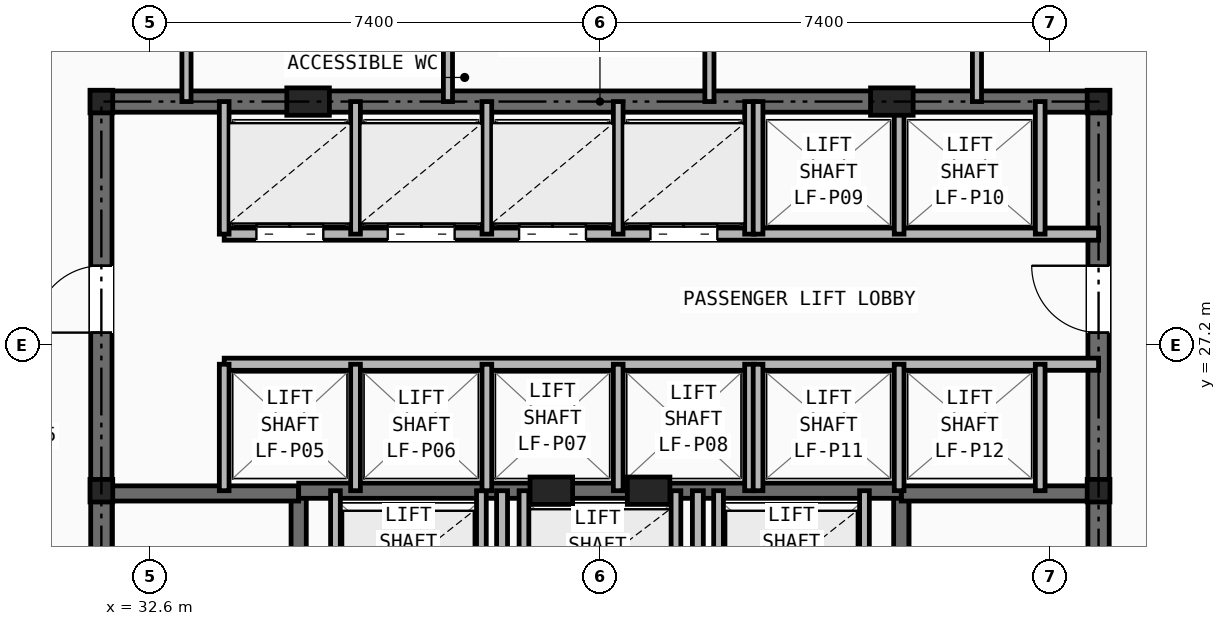
"""IFC4 building model, lengths in metres.
Left out: names, types, materials, properties, quantities, classifications, styles, units other than length and angle.
Written with IfcOpenShell. Run it as: python <this file> out.ifc"""

import sys

from ifc_helpers import new_model, si_unit, direction, frame, frame_2d, origin, origin_2d, place, context, subcontext, project, spatial, rectangle, i_section, extrude, element, fill, save


model = new_model("IFC4")
c1 = context("Model", 3, precision=1e-05, world=origin(), true_north=direction((0.0, 1.0)))
c2 = subcontext(c1, "Body", "Model", "MODEL_VIEW")
j1 = project(units=[si_unit("LENGTHUNIT", "METRE"), si_unit("PLANEANGLEUNIT", "RADIAN")], contexts=[c1])
p1 = place(None, origin())
s1 = spatial("IfcSite", under=j1, at=p1, CompositionType="ELEMENT")
p2 = place(p1, origin())
s2 = spatial("IfcBuilding", under=s1, at=p2, CompositionType="ELEMENT")
p3 = place(p2, frame((0.0, 0.0, 59.2)))
s3 = spatial("IfcBuildingStorey", under=s2, at=p3, CompositionType="ELEMENT", Elevation=59.2)
for number, where, z_axis, x_axis in (
    (1, (31.8, 24.8, 0.0), (0.0, 0.0, 1.0), (1.0, 0.0, 0.0)),
    (2, (48.2, 24.8, 0.0), (0.0, 0.0, 1.0), (1.0, 0.0, 0.0)),
    (3, (31.8, 31.2, 0.0), (0.0, 0.0, 1.0), (1.0, 0.0, 0.0)),
    (4, (48.2, 31.2, 0.0), (0.0, 0.0, 1.0), (1.0, 0.0, 0.0)),
):
    element("IfcColumn", number, at=place(p3, frame(where, z_axis=z_axis, x_axis=x_axis)), inside=s3, PredefinedType="COLUMN", context=c2, shape_type="SweptSolid", body=[
        extrude(i_section(OverallWidth=0.374, OverallDepth=0.372, WebThickness=0.016, FlangeThickness=0.026, at=origin_2d()), origin(), (0.0, 0.0, 1.0), 3.2),
    ])
for number, where, z_axis, x_axis in (
    (5, (35.2, 31.2, 0.0), (0.0, 0.0, 1.0), (1.0, 0.0, 0.0)),
    (6, (44.8, 31.2, 0.0), (0.0, 0.0, 1.0), (1.0, 0.0, 0.0)),
    (7, (39.2, 24.8, 0.0), (0.0, 0.0, 1.0), (1.0, 0.0, 0.0)),
    (8, (40.8, 24.8, 0.0), (0.0, 0.0, 1.0), (1.0, 0.0, 0.0)),
):
    element("IfcColumn", number, at=place(p3, frame(where, z_axis=z_axis, x_axis=x_axis)), inside=s3, PredefinedType="PILASTER", context=c2, shape_type="SweptSolid", body=[
        extrude(rectangle(XDim=0.7, YDim=0.45, at=origin_2d()), origin(), (0.0, 0.0, 1.0), 3.2),
    ])
p4 = place(p3, frame((31.8, 31.2, 0.0), z_axis=(0.0, 0.0, 1.0), x_axis=(1.0, 0.0, 0.0)))
e9 = element("IfcWall", 9, at=p4, inside=s3, PredefinedType="SHEAR", context=c2, shape_type="SweptSolid", body=[
    extrude(rectangle(XDim=16.4, YDim=0.35, at=frame_2d((8.2, 0.0))), origin(), (0.0, 0.0, 1.0), 2.98),
])
p5 = place(p3, frame((31.8, 16.4, 0.0), z_axis=(0.0, 0.0, 1.0), x_axis=(0.0, 1.0, 0.0)))
e10 = element("IfcWall", 10, at=p5, inside=s3, PredefinedType="SHEAR", context=c2, shape_type="SweptSolid", body=[
    extrude(rectangle(XDim=14.8, YDim=0.35, at=frame_2d((7.4, 0.0))), origin(), (0.0, 0.0, 1.0), 2.98),
])
p6 = place(p5, frame((11.0, 0.0, 0.0)))
e11 = element("IfcOpeningElement", 11, at=p6, cuts=e10, PredefinedType="OPENING", context=c2, shape_type="SweptSolid", body=[
    extrude(rectangle(XDim=1.1, YDim=2.15, at=frame_2d((0.55, 1.075))), frame((0.0, 0.185, 0.0), z_axis=(0.0, -1.0, 0.0), x_axis=(1.0, 0.0, 0.0)), (0.0, 0.0, 1.0), 0.37),
])
p7 = place(p3, frame((48.2, 16.4, 0.0), z_axis=(0.0, 0.0, 1.0), x_axis=(0.0, 1.0, 0.0)))
e12 = element("IfcWall", 12, at=p7, inside=s3, PredefinedType="SHEAR", context=c2, shape_type="SweptSolid", body=[
    extrude(rectangle(XDim=14.8, YDim=0.35, at=frame_2d((7.4, 0.0))), origin(), (0.0, 0.0, 1.0), 2.98),
])
p8 = place(p7, frame((11.0, 0.0, 0.0)))
e13 = element("IfcOpeningElement", 13, at=p8, cuts=e12, PredefinedType="OPENING", context=c2, shape_type="SweptSolid", body=[
    extrude(rectangle(XDim=1.1, YDim=2.15, at=frame_2d((0.55, 1.075))), frame((0.0, 0.185, 0.0), z_axis=(0.0, -1.0, 0.0), x_axis=(1.0, 0.0, 0.0)), (0.0, 0.0, 1.0), 0.37),
])
p9 = place(p3, frame((35.045, 16.4, 0.0), z_axis=(0.0, 0.0, 1.0), x_axis=(0.0, 1.0, 0.0)))
e14 = element("IfcWall", 14, at=p9, inside=s3, PredefinedType="SHEAR", context=c2, shape_type="SweptSolid", body=[
    extrude(rectangle(XDim=8.4, YDim=0.25, at=frame_2d((4.2, 0.0))), origin(), (0.0, 0.0, 1.0), 2.98),
])
p10 = place(p9, frame((0.45, 0.0, 0.0)))
e15 = element("IfcOpeningElement", 15, at=p10, cuts=e14, PredefinedType="OPENING", context=c2, shape_type="SweptSolid", body=[
    extrude(rectangle(XDim=0.95, YDim=2.1, at=frame_2d((0.475, 1.05))), frame((0.0, 0.135, 0.0), z_axis=(0.0, -1.0, 0.0), x_axis=(1.0, 0.0, 0.0)), (0.0, 0.0, 1.0), 0.27),
])
p11 = place(p3, frame((31.8, 24.755, 0.0), z_axis=(0.0, 0.0, 1.0), x_axis=(1.0, 0.0, 0.0)))
e16 = element("IfcWall", 16, at=p11, inside=s3, PredefinedType="SHEAR", context=c2, shape_type="SweptSolid", body=[
    extrude(rectangle(XDim=3.245, YDim=0.25, at=frame_2d((1.623, 0.0))), origin(), (0.0, 0.0, 1.0), 2.98),
])
p12 = place(p3, frame((44.955, 16.4, 0.0), z_axis=(0.0, 0.0, 1.0), x_axis=(0.0, 1.0, 0.0)))
e17 = element("IfcWall", 17, at=p12, inside=s3, PredefinedType="SHEAR", context=c2, shape_type="SweptSolid", body=[
    extrude(rectangle(XDim=8.4, YDim=0.25, at=frame_2d((4.2, 0.0))), origin(), (0.0, 0.0, 1.0), 2.98),
])
p13 = place(p12, frame((0.45, 0.0, 0.0)))
e18 = element("IfcOpeningElement", 18, at=p13, cuts=e17, PredefinedType="OPENING", context=c2, shape_type="SweptSolid", body=[
    extrude(rectangle(XDim=0.95, YDim=2.1, at=frame_2d((0.475, 1.05))), frame((0.0, 0.135, 0.0), z_axis=(0.0, -1.0, 0.0), x_axis=(1.0, 0.0, 0.0)), (0.0, 0.0, 1.0), 0.27),
])
p14 = place(p3, frame((44.955, 24.755, 0.0), z_axis=(0.0, 0.0, 1.0), x_axis=(1.0, 0.0, 0.0)))
e19 = element("IfcWall", 19, at=p14, inside=s3, PredefinedType="SHEAR", context=c2, shape_type="SweptSolid", body=[
    extrude(rectangle(XDim=3.245, YDim=0.25, at=frame_2d((1.623, 0.0))), origin(), (0.0, 0.0, 1.0), 2.98),
])
p15 = place(p3, frame((35.045, 24.8, 0.0), z_axis=(0.0, 0.0, 1.0), x_axis=(1.0, 0.0, 0.0)))
e20 = element("IfcWall", 20, at=p15, inside=s3, PredefinedType="SHEAR", context=c2, shape_type="SweptSolid", body=[
    extrude(rectangle(XDim=9.91, YDim=0.25, at=frame_2d((4.955, 0.0))), origin(), (0.0, 0.0, 1.0), 2.98),
])
p16 = place(p3, frame((38.39, 16.4, 0.0), z_axis=(0.0, 0.0, 1.0), x_axis=(0.0, 1.0, 0.0)))
e21 = element("IfcWall", 21, at=p16, inside=s3, PredefinedType="PARTITIONING", context=c2, shape_type="SweptSolid", body=[
    extrude(rectangle(XDim=8.4, YDim=0.18, at=frame_2d((4.2, 0.0))), origin(), (0.0, 0.0, 1.0), 2.431),
])
p17 = place(p16, frame((1.8, 0.0, 0.0)))
e22 = element("IfcOpeningElement", 22, at=p17, cuts=e21, PredefinedType="OPENING", context=c2, shape_type="SweptSolid", body=[
    extrude(rectangle(XDim=0.85, YDim=2.05, at=frame_2d((0.425, 1.025))), frame((0.0, 0.1, 0.0), z_axis=(0.0, -1.0, 0.0), x_axis=(1.0, 0.0, 0.0)), (0.0, 0.0, 1.0), 0.2),
])
p18 = place(p16, frame((4.35, 0.0, 0.0)))
e23 = element("IfcOpeningElement", 23, at=p18, cuts=e21, PredefinedType="OPENING", context=c2, shape_type="SweptSolid", body=[
    extrude(rectangle(XDim=0.95, YDim=2.1, at=frame_2d((0.475, 1.05))), frame((0.0, 0.1, 0.0), z_axis=(0.0, -1.0, 0.0), x_axis=(1.0, 0.0, 0.0)), (0.0, 0.0, 1.0), 0.2),
])
p19 = place(p3, frame((41.61, 16.4, 0.0), z_axis=(0.0, 0.0, 1.0), x_axis=(0.0, 1.0, 0.0)))
e24 = element("IfcWall", 24, at=p19, inside=s3, PredefinedType="PARTITIONING", context=c2, shape_type="SweptSolid", body=[
    extrude(rectangle(XDim=8.4, YDim=0.18, at=frame_2d((4.2, 0.0))), origin(), (0.0, 0.0, 1.0), 2.431),
])
p20 = place(p19, frame((1.8, 0.0, 0.0)))
e25 = element("IfcOpeningElement", 25, at=p20, cuts=e24, PredefinedType="OPENING", context=c2, shape_type="SweptSolid", body=[
    extrude(rectangle(XDim=0.85, YDim=2.05, at=frame_2d((0.425, 1.025))), frame((0.0, 0.1, 0.0), z_axis=(0.0, -1.0, 0.0), x_axis=(1.0, 0.0, 0.0)), (0.0, 0.0, 1.0), 0.2),
])
for number, where, z_axis, x_axis in (
    (26, (35.65, 22.48, 0.0), (0.0, 0.0, 1.0), (0.0, 1.0, 0.0)),
    (27, (38.05, 22.48, 0.0), (0.0, 0.0, 1.0), (0.0, 1.0, 0.0)),
    (28, (41.95, 22.48, 0.0), (0.0, 0.0, 1.0), (0.0, 1.0, 0.0)),
    (29, (44.35, 22.48, 0.0), (0.0, 0.0, 1.0), (0.0, 1.0, 0.0)),
    (30, (38.75, 22.48, 0.0), (0.0, 0.0, 1.0), (0.0, 1.0, 0.0)),
    (31, (41.25, 22.48, 0.0), (0.0, 0.0, 1.0), (0.0, 1.0, 0.0)),
):
    element("IfcWall", number, at=place(p3, frame(where, z_axis=z_axis, x_axis=x_axis)), inside=s3, PredefinedType="SOLIDWALL", context=c2, shape_type="SweptSolid", body=[
        extrude(rectangle(XDim=2.32, YDim=0.16, at=frame_2d((1.16, 0.0))), origin(), (0.0, 0.0, 1.0), 2.98),
    ])
p21 = place(p3, frame((33.82, 29.02, 0.0), z_axis=(0.0, 0.0, 1.0), x_axis=(1.0, 0.0, 0.0)))
e32 = element("IfcWall", 32, at=p21, inside=s3, PredefinedType="SOLIDWALL", context=c2, shape_type="SweptSolid", body=[
    extrude(rectangle(XDim=14.38, YDim=0.2, at=frame_2d((7.19, 0.0))), origin(), (0.0, 0.0, 1.0), 2.431),
])
p22 = place(p21, frame((0.53, 0.0, 0.0)))
e33 = element("IfcOpeningElement", 33, at=p22, cuts=e32, PredefinedType="OPENING", context=c2, shape_type="SweptSolid", body=[
    extrude(rectangle(XDim=1.1, YDim=2.15, at=frame_2d((0.55, 1.075))), frame((0.0, 0.11, 0.0), z_axis=(0.0, -1.0, 0.0), x_axis=(1.0, 0.0, 0.0)), (0.0, 0.0, 1.0), 0.22),
])
p23 = place(p21, frame((2.69, 0.0, 0.0)))
e34 = element("IfcOpeningElement", 34, at=p23, cuts=e32, PredefinedType="OPENING", context=c2, shape_type="SweptSolid", body=[
    extrude(rectangle(XDim=1.1, YDim=2.15, at=frame_2d((0.55, 1.075))), frame((0.0, 0.11, 0.0), z_axis=(0.0, -1.0, 0.0), x_axis=(1.0, 0.0, 0.0)), (0.0, 0.0, 1.0), 0.22),
])
p24 = place(p21, frame((4.85, 0.0, 0.0)))
e35 = element("IfcOpeningElement", 35, at=p24, cuts=e32, PredefinedType="OPENING", context=c2, shape_type="SweptSolid", body=[
    extrude(rectangle(XDim=1.1, YDim=2.15, at=frame_2d((0.55, 1.075))), frame((0.0, 0.11, 0.0), z_axis=(0.0, -1.0, 0.0), x_axis=(1.0, 0.0, 0.0)), (0.0, 0.0, 1.0), 0.22),
])
p25 = place(p21, frame((7.01, 0.0, 0.0)))
e36 = element("IfcOpeningElement", 36, at=p25, cuts=e32, PredefinedType="OPENING", context=c2, shape_type="SweptSolid", body=[
    extrude(rectangle(XDim=1.1, YDim=2.15, at=frame_2d((0.55, 1.075))), frame((0.0, 0.11, 0.0), z_axis=(0.0, -1.0, 0.0), x_axis=(1.0, 0.0, 0.0)), (0.0, 0.0, 1.0), 0.22),
])
p26 = place(p3, frame((33.82, 26.88, 0.0), z_axis=(0.0, 0.0, 1.0), x_axis=(1.0, 0.0, 0.0)))
e37 = element("IfcWall", 37, at=p26, inside=s3, PredefinedType="SOLIDWALL", context=c2, shape_type="SweptSolid", body=[
    extrude(rectangle(XDim=14.38, YDim=0.2, at=frame_2d((7.19, 0.0))), origin(), (0.0, 0.0, 1.0), 2.431),
])
p27 = place(p3, frame((33.82, 29.02, 0.0), z_axis=(0.0, 0.0, 1.0), x_axis=(0.0, 1.0, 0.0)))
e38 = element("IfcWall", 38, at=p27, inside=s3, PredefinedType="SOLIDWALL", context=c2, shape_type="SweptSolid", body=[
    extrude(rectangle(XDim=2.18, YDim=0.16, at=frame_2d((1.09, 0.0))), origin(), (0.0, 0.0, 1.0), 2.431),
])
p28 = place(p3, frame((33.82, 24.8, 0.0), z_axis=(0.0, 0.0, 1.0), x_axis=(0.0, 1.0, 0.0)))
e39 = element("IfcWall", 39, at=p28, inside=s3, PredefinedType="SOLIDWALL", context=c2, shape_type="SweptSolid", body=[
    extrude(rectangle(XDim=2.08, YDim=0.16, at=frame_2d((1.04, 0.0))), origin(), (0.0, 0.0, 1.0), 2.98),
])
for number, where, z_axis, x_axis in (
    (40, (35.98, 29.02, 0.0), (0.0, 0.0, 1.0), (0.0, 1.0, 0.0)),
    (41, (38.14, 29.02, 0.0), (0.0, 0.0, 1.0), (0.0, 1.0, 0.0)),
    (42, (40.3, 29.02, 0.0), (0.0, 0.0, 1.0), (0.0, 1.0, 0.0)),
    (43, (42.46, 29.02, 0.0), (0.0, 0.0, 1.0), (0.0, 1.0, 0.0)),
):
    element("IfcWall", number, at=place(p3, frame(where, z_axis=z_axis, x_axis=x_axis)), inside=s3, PredefinedType="SOLIDWALL", context=c2, shape_type="SweptSolid", body=[
        extrude(rectangle(XDim=2.18, YDim=0.16, at=frame_2d((1.09, 0.0))), origin(), (0.0, 0.0, 1.0), 2.431),
    ])
for number, where, z_axis, x_axis in (
    (44, (35.98, 24.8, 0.0), (0.0, 0.0, 1.0), (0.0, 1.0, 0.0)),
    (45, (38.14, 24.8, 0.0), (0.0, 0.0, 1.0), (0.0, 1.0, 0.0)),
    (46, (40.3, 24.8, 0.0), (0.0, 0.0, 1.0), (0.0, 1.0, 0.0)),
    (47, (42.46, 24.8, 0.0), (0.0, 0.0, 1.0), (0.0, 1.0, 0.0)),
):
    element("IfcWall", number, at=place(p3, frame(where, z_axis=z_axis, x_axis=x_axis)), inside=s3, PredefinedType="SOLIDWALL", context=c2, shape_type="SweptSolid", body=[
        extrude(rectangle(XDim=2.08, YDim=0.16, at=frame_2d((1.04, 0.0))), origin(), (0.0, 0.0, 1.0), 2.98),
    ])
for number, where, z_axis, x_axis in (
    (48, (42.6, 29.02, 0.0), (0.0, 0.0, 1.0), (0.0, 1.0, 0.0)),
    (49, (44.92, 29.02, 0.0), (0.0, 0.0, 1.0), (0.0, 1.0, 0.0)),
    (50, (47.24, 29.02, 0.0), (0.0, 0.0, 1.0), (0.0, 1.0, 0.0)),
):
    element("IfcWall", number, at=place(p3, frame(where, z_axis=z_axis, x_axis=x_axis)), inside=s3, PredefinedType="SOLIDWALL", context=c2, shape_type="SweptSolid", body=[
        extrude(rectangle(XDim=2.18, YDim=0.16, at=frame_2d((1.09, 0.0))), origin(), (0.0, 0.0, 1.0), 2.431),
    ])
for number, where, z_axis, x_axis in (
    (51, (42.6, 24.8, 0.0), (0.0, 0.0, 1.0), (0.0, 1.0, 0.0)),
    (52, (44.92, 24.8, 0.0), (0.0, 0.0, 1.0), (0.0, 1.0, 0.0)),
    (53, (47.24, 24.8, 0.0), (0.0, 0.0, 1.0), (0.0, 1.0, 0.0)),
):
    element("IfcWall", number, at=place(p3, frame(where, z_axis=z_axis, x_axis=x_axis)), inside=s3, PredefinedType="SOLIDWALL", context=c2, shape_type="SweptSolid", body=[
        extrude(rectangle(XDim=2.08, YDim=0.16, at=frame_2d((1.04, 0.0))), origin(), (0.0, 0.0, 1.0), 2.98),
    ])
for number, where, z_axis, x_axis in (
    (54, (33.2, 31.2, 0.0), (0.0, 0.0, 1.0), (0.0, 1.0, 0.0)),
    (55, (46.2, 31.2, 0.0), (0.0, 0.0, 1.0), (0.0, 1.0, 0.0)),
    (56, (37.5, 31.2, 0.0), (0.0, 0.0, 1.0), (0.0, 1.0, 0.0)),
    (57, (41.8, 31.2, 0.0), (0.0, 0.0, 1.0), (0.0, 1.0, 0.0)),
):
    element("IfcWall", number, at=place(p3, frame(where, z_axis=z_axis, x_axis=x_axis)), inside=s3, PredefinedType="PARTITIONING", context=c2, shape_type="SweptSolid", body=[
        extrude(rectangle(XDim=2.6, YDim=0.15, at=frame_2d((1.3, 0.0))), origin(), (0.0, 0.0, 1.0), 2.431),
    ])
p29 = place(p6, origin())
e58 = element("IfcDoor", 58, at=p29, inside=s3, OperationType="SINGLE_SWING_LEFT", PredefinedType="DOOR", context=c2, shape_type="SweptSolid", body=[
    extrude(rectangle(XDim=1.1, YDim=2.15, at=frame_2d((0.55, 1.075))), frame((0.0, 0.025, 0.0), z_axis=(0.0, -1.0, 0.0), x_axis=(1.0, 0.0, 0.0)), (0.0, 0.0, 1.0), 0.05),
])
fill(e11, e58)
p30 = place(p8, origin())
e59 = element("IfcDoor", 59, at=p30, inside=s3, OperationType="SINGLE_SWING_RIGHT", PredefinedType="DOOR", context=c2, shape_type="SweptSolid", body=[
    extrude(rectangle(XDim=1.1, YDim=2.15, at=frame_2d((0.55, 1.075))), frame((0.0, 0.025, 0.0), z_axis=(0.0, -1.0, 0.0), x_axis=(1.0, 0.0, 0.0)), (0.0, 0.0, 1.0), 0.05),
])
fill(e13, e59)
p31 = place(p22, origin())
e60 = element("IfcDoor", 60, at=p31, inside=s3, OperationType="DOUBLE_DOOR_SLIDING", PredefinedType="DOOR", context=c2, shape_type="SweptSolid", body=[
    extrude(rectangle(XDim=1.1, YDim=2.15, at=frame_2d((0.55, 1.075))), frame((0.0, 0.025, 0.0), z_axis=(0.0, -1.0, 0.0), x_axis=(1.0, 0.0, 0.0)), (0.0, 0.0, 1.0), 0.05),
])
fill(e33, e60)
p32 = place(p23, origin())
e61 = element("IfcDoor", 61, at=p32, inside=s3, OperationType="DOUBLE_DOOR_SLIDING", PredefinedType="DOOR", context=c2, shape_type="SweptSolid", body=[
    extrude(rectangle(XDim=1.1, YDim=2.15, at=frame_2d((0.55, 1.075))), frame((0.0, 0.025, 0.0), z_axis=(0.0, -1.0, 0.0), x_axis=(1.0, 0.0, 0.0)), (0.0, 0.0, 1.0), 0.05),
])
fill(e34, e61)
p33 = place(p24, origin())
e62 = element("IfcDoor", 62, at=p33, inside=s3, OperationType="DOUBLE_DOOR_SLIDING", PredefinedType="DOOR", context=c2, shape_type="SweptSolid", body=[
    extrude(rectangle(XDim=1.1, YDim=2.15, at=frame_2d((0.55, 1.075))), frame((0.0, 0.025, 0.0), z_axis=(0.0, -1.0, 0.0), x_axis=(1.0, 0.0, 0.0)), (0.0, 0.0, 1.0), 0.05),
])
fill(e35, e62)
p34 = place(p25, origin())
e63 = element("IfcDoor", 63, at=p34, inside=s3, OperationType="DOUBLE_DOOR_SLIDING", PredefinedType="DOOR", context=c2, shape_type="SweptSolid", body=[
    extrude(rectangle(XDim=1.1, YDim=2.15, at=frame_2d((0.55, 1.075))), frame((0.0, 0.025, 0.0), z_axis=(0.0, -1.0, 0.0), x_axis=(1.0, 0.0, 0.0)), (0.0, 0.0, 1.0), 0.05),
])
fill(e36, e63)
save(model, sys.argv[1])
